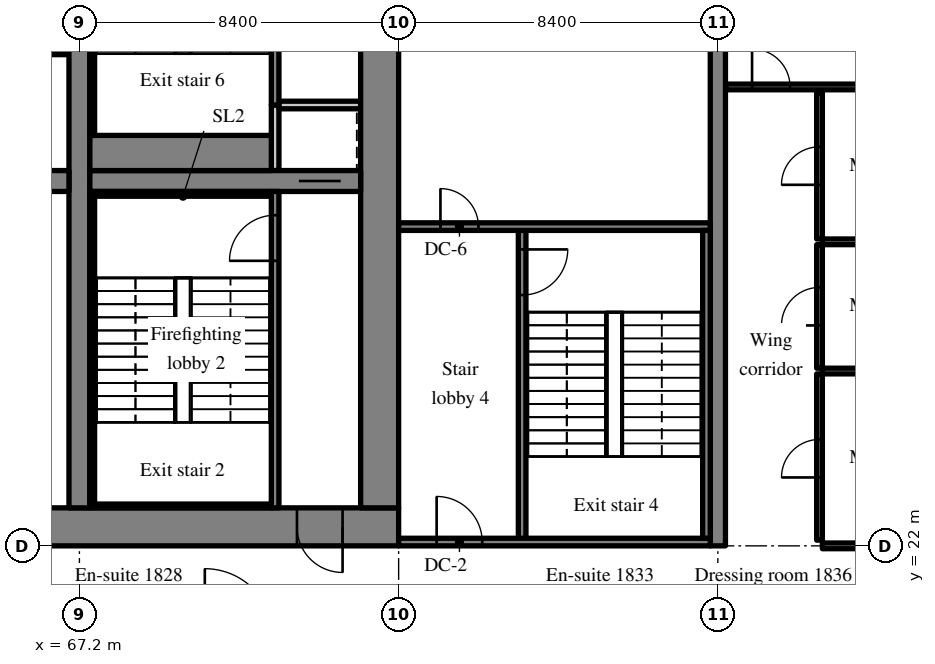
"""IFC4 building model, lengths in metres.
Left out: names, types, materials, properties, quantities, classifications, styles, units other than length and angle.
Written with IfcOpenShell. Run it as: python <this file> out.ifc"""

import sys

from ifc_helpers import new_model, si_unit, direction, frame, frame_2d, origin, place, context, subcontext, project, spatial, rectangle, extrude, source, transform, mapped, element, fill, save


model = new_model("IFC4")
c1 = context("Model", 3, precision=1e-05, world=origin(), true_north=direction((0.0, 1.0)))
c2 = subcontext(c1, "Body", "Model", "MODEL_VIEW")
j1 = project(units=[si_unit("LENGTHUNIT", "METRE"), si_unit("PLANEANGLEUNIT", "RADIAN")], contexts=[c1])
p1 = place(None, origin())
s1 = spatial("IfcSite", under=j1, at=p1, CompositionType="ELEMENT")
p2 = place(p1, origin())
s2 = spatial("IfcBuilding", under=s1, at=p2, CompositionType="ELEMENT")
p3 = place(p2, frame((0.0, 0.0, 77.2)))
s3 = spatial("IfcBuildingStorey", under=s2, at=p3, CompositionType="ELEMENT", Elevation=77.2)
m1 = source(origin(), c2, "Body", "SweptSolid", [
    extrude(rectangle(XDim=50.4, YDim=1.0, at=frame_2d((25.2, 0.0))), origin(), (0.0, 0.0, 1.0), 3.52),
])
p4 = place(p3, frame((25.2, 22.5, 0.0), z_axis=(0.0, 0.0, 1.0), x_axis=(1.0, 0.0, 0.0)))
e1 = element("IfcWall", 1, at=p4, inside=s3, PredefinedType="SHEAR", context=c2, shape_type="MappedRepresentation", body=[
    mapped(m1, transform((0.0, 0.0, 0.0), scale=1.0)),
])
m2 = source(origin(), c2, "Body", "SweptSolid", [
    extrude(rectangle(XDim=1.8, YDim=2.1, at=frame_2d((0.9, 1.05))), frame((0.0, 0.51, 0.0), z_axis=(0.0, -1.0, 0.0), x_axis=(1.0, 0.0, 0.0)), (0.0, 0.0, 1.0), 1.02),
])
p5 = place(p4, frame((15.9, 0.0, 0.0)))
e2 = element("IfcOpeningElement", 2, at=p5, cuts=e1, PredefinedType="OPENING", context=c2, shape_type="MappedRepresentation", body=[
    mapped(m2, transform((0.0, 0.0, 0.0), scale=1.0)),
])
m3 = source(origin(), c2, "Body", "SweptSolid", [
    extrude(rectangle(XDim=1.2, YDim=2.1, at=frame_2d((0.6, 1.05))), frame((0.0, 0.51, 0.0), z_axis=(0.0, -1.0, 0.0), x_axis=(1.0, 0.0, 0.0)), (0.0, 0.0, 1.0), 1.02),
])
p6 = place(p4, frame((26.987, 0.0, 0.0)))
e3 = element("IfcOpeningElement", 3, at=p6, cuts=e1, PredefinedType="OPENING", context=c2, shape_type="MappedRepresentation", body=[
    mapped(m3, transform((0.0, 0.0, 0.0), scale=1.0)),
])
m4 = source(origin(), c2, "Body", "SweptSolid", [
    extrude(rectangle(XDim=0.9, YDim=2.1, at=frame_2d((0.45, 1.05))), frame((0.0, 0.51, 0.0), z_axis=(0.0, -1.0, 0.0), x_axis=(1.0, 0.0, 0.0)), (0.0, 0.0, 1.0), 1.02),
])
p7 = place(p4, frame((32.25, 0.0, 0.0)))
e4 = element("IfcOpeningElement", 4, at=p7, cuts=e1, PredefinedType="OPENING", context=c2, shape_type="MappedRepresentation", body=[
    mapped(m4, transform((0.0, 0.0, 0.0), scale=1.0)),
])
p8 = place(p4, frame((38.262, 0.0, 0.0)))
e5 = element("IfcOpeningElement", 5, at=p8, cuts=e1, PredefinedType="OPENING", context=c2, shape_type="MappedRepresentation", body=[
    mapped(m4, transform((0.0, 0.0, 0.0), scale=1.0)),
])
p9 = place(p4, frame((6.438, 0.0, 0.0)))
e6 = element("IfcOpeningElement", 6, at=p9, cuts=e1, PredefinedType="OPENING", context=c2, shape_type="MappedRepresentation", body=[
    mapped(m3, transform((0.0, 0.0, 0.0), scale=1.0)),
])
p10 = place(p4, frame((47.725, 0.0, 0.0)))
e7 = element("IfcOpeningElement", 7, at=p10, cuts=e1, PredefinedType="OPENING", context=c2, shape_type="MappedRepresentation", body=[
    mapped(m3, transform((0.0, 0.0, 0.0), scale=1.0)),
])
m5 = source(origin(), c2, "Body", "SweptSolid", [
    extrude(rectangle(XDim=18.0, YDim=1.0, at=frame_2d((9.0, 0.0))), origin(), (0.0, 0.0, 1.0), 3.52),
])
p11 = place(p3, frame((75.1, 23.0, 0.0), z_axis=(0.0, 0.0, 1.0), x_axis=(0.0, 1.0, 0.0)))
e8 = element("IfcWall", 8, at=p11, inside=s3, PredefinedType="SHEAR", context=c2, shape_type="MappedRepresentation", body=[
    mapped(m5, transform((0.0, 0.0, 0.0), scale=1.0)),
])
p12 = place(p11, frame((12.4, 0.0, 0.0)))
e9 = element("IfcOpeningElement", 9, at=p12, cuts=e8, PredefinedType="OPENING", context=c2, shape_type="MappedRepresentation", body=[
    mapped(m3, transform((0.0, 0.0, 0.0), scale=1.0)),
])
m6 = source(origin(), c2, "Body", "SweptSolid", [
    extrude(rectangle(XDim=18.0, YDim=0.55, at=frame_2d((9.0, 0.0))), origin(), (0.0, 0.0, 1.0), 3.52),
])
p13 = place(p3, frame((67.2, 23.0, 0.0), z_axis=(0.0, 0.0, 1.0), x_axis=(0.0, 1.0, 0.0)))
e10 = element("IfcWall", 10, at=p13, inside=s3, PredefinedType="SHEAR", context=c2, shape_type="MappedRepresentation", body=[
    mapped(m6, transform((0.0, 0.0, 0.0), scale=1.0)),
])
m7 = source(origin(), c2, "Body", "SweptSolid", [
    extrude(rectangle(XDim=16.25, YDim=0.55, at=frame_2d((8.125, 0.0))), origin(), (0.0, 0.0, 1.0), 3.52),
])
p14 = place(p3, frame((50.675, 31.6, 0.0), z_axis=(0.0, 0.0, 1.0), x_axis=(1.0, 0.0, 0.0)))
e11 = element("IfcWall", 11, at=p14, inside=s3, PredefinedType="SHEAR", context=c2, shape_type="MappedRepresentation", body=[
    mapped(m7, transform((0.0, 0.0, 0.0), scale=1.0)),
])
m8 = source(origin(), c2, "Body", "SweptSolid", [
    extrude(rectangle(XDim=1.0, YDim=2.1, at=frame_2d((0.5, 1.05))), frame((0.0, 0.285, 0.0), z_axis=(0.0, -1.0, 0.0), x_axis=(1.0, 0.0, 0.0)), (0.0, 0.0, 1.0), 0.57),
])
p15 = place(p14, frame((0.562, 0.0, 0.0)))
e12 = element("IfcOpeningElement", 12, at=p15, cuts=e11, PredefinedType="OPENING", context=c2, shape_type="MappedRepresentation", body=[
    mapped(m8, transform((0.0, 0.0, 0.0), scale=1.0)),
])
m9 = source(origin(), c2, "Body", "SweptSolid", [
    extrude(rectangle(XDim=7.125, YDim=0.55, at=frame_2d((3.562, 0.0))), origin(), (0.0, 0.0, 1.0), 3.52),
])
p16 = place(p3, frame((67.475, 31.6, 0.0), z_axis=(0.0, 0.0, 1.0), x_axis=(1.0, 0.0, 0.0)))
e13 = element("IfcWall", 13, at=p16, inside=s3, PredefinedType="SHEAR", context=c2, shape_type="MappedRepresentation", body=[
    mapped(m9, transform((0.0, 0.0, 0.0), scale=1.0)),
])
m10 = source(origin(), c2, "Body", "SweptSolid", [
    extrude(rectangle(XDim=1.1, YDim=2.1, at=frame_2d((0.55, 1.05))), frame((0.0, 0.285, 0.0), z_axis=(0.0, -1.0, 0.0), x_axis=(1.0, 0.0, 0.0)), (0.0, 0.0, 1.0), 0.57),
])
p17 = place(p16, frame((5.5, 0.0, 0.0)))
e14 = element("IfcOpeningElement", 14, at=p17, cuts=e13, PredefinedType="OPENING", context=c2, shape_type="MappedRepresentation", body=[
    mapped(m10, transform((0.0, 0.0, 0.0), scale=1.0)),
])
m11 = source(origin(), c2, "Body", "SweptSolid", [
    extrude(rectangle(XDim=20.0, YDim=0.4, at=frame_2d((10.0, 0.0))), origin(), (0.0, 0.0, 1.0), 3.52),
])
p18 = place(p3, frame((84.0, 22.0, 0.0), z_axis=(0.0, 0.0, 1.0), x_axis=(0.0, 1.0, 0.0)))
e15 = element("IfcWall", 15, at=p18, inside=s3, PredefinedType="SHEAR", context=c2, shape_type="MappedRepresentation", body=[
    mapped(m11, transform((0.0, 0.0, 0.0), scale=1.0)),
])
m12 = source(origin(), c2, "Body", "SweptSolid", [
    extrude(rectangle(XDim=14.125, YDim=0.15, at=frame_2d((7.062, 0.0))), origin(), (0.0, 0.0, 1.0), 3.52),
])
p19 = place(p3, frame((66.925, 35.0, 0.0), z_axis=(0.0, 0.0, 1.0), x_axis=(-1.0, 0.0, 0.0)))
e16 = element("IfcWall", 16, at=p19, inside=s3, PredefinedType="PARTITIONING", context=c2, shape_type="MappedRepresentation", body=[
    mapped(m12, transform((0.0, 0.0, 0.0), scale=1.0)),
])
m13 = source(origin(), c2, "Body", "SweptSolid", [
    extrude(rectangle(XDim=0.9, YDim=2.1, at=frame_2d((0.45, 1.05))), frame((0.0, 0.085, 0.0), z_axis=(0.0, -1.0, 0.0), x_axis=(1.0, 0.0, 0.0)), (0.0, 0.0, 1.0), 0.17),
])
p20 = place(p19, frame((6.575, 0.0, 0.0)))
e17 = element("IfcOpeningElement", 17, at=p20, cuts=e16, PredefinedType="OPENING", context=c2, shape_type="MappedRepresentation", body=[
    mapped(m13, transform((0.0, 0.0, 0.0), scale=1.0)),
])
m14 = source(origin(), c2, "Body", "SweptSolid", [
    extrude(rectangle(XDim=8.325, YDim=0.2, at=frame_2d((4.163, 0.0))), origin(), (0.0, 0.0, 1.0), 3.52),
])
p21 = place(p3, frame((72.35, 23.0, 0.0), z_axis=(0.0, 0.0, 1.0), x_axis=(0.0, 1.0, 0.0)))
e18 = element("IfcWall", 18, at=p21, inside=s3, PredefinedType="SOLIDWALL", context=c2, shape_type="MappedRepresentation", body=[
    mapped(m14, transform((0.0, 0.0, 0.0), scale=1.0)),
])
m15 = source(origin(), c2, "Body", "SweptSolid", [
    extrude(rectangle(XDim=1.2, YDim=2.1, at=frame_2d((0.6, 1.05))), frame((0.0, 0.11, 0.0), z_axis=(0.0, -1.0, 0.0), x_axis=(1.0, 0.0, 0.0)), (0.0, 0.0, 1.0), 0.22),
])
p22 = place(p21, frame((6.5, 0.0, 0.0)))
e19 = element("IfcOpeningElement", 19, at=p22, cuts=e18, PredefinedType="OPENING", context=c2, shape_type="MappedRepresentation", body=[
    mapped(m15, transform((0.0, 0.0, 0.0), scale=1.0)),
])
m16 = source(origin(), c2, "Body", "SweptSolid", [
    extrude(rectangle(XDim=1.725, YDim=0.2, at=frame_2d((0.863, 0.0))), origin(), (0.0, 0.0, 1.0), 3.52),
])
p23 = place(p3, frame((72.35, 31.875, 0.0), z_axis=(0.0, 0.0, 1.0), x_axis=(0.0, 1.0, 0.0)))
e20 = element("IfcWall", 20, at=p23, inside=s3, PredefinedType="SOLIDWALL", context=c2, shape_type="MappedRepresentation", body=[
    mapped(m16, transform((0.0, 0.0, 0.0), scale=1.0)),
])
m17 = source(origin(), c2, "Body", "SweptSolid", [
    extrude(rectangle(XDim=2.15, YDim=0.2, at=frame_2d((1.075, 0.0))), origin(), (0.0, 0.0, 1.0), 3.52),
])
p24 = place(p3, frame((72.45, 33.6, 0.0), z_axis=(0.0, 0.0, 1.0), x_axis=(1.0, 0.0, 0.0)))
e21 = element("IfcWall", 21, at=p24, inside=s3, PredefinedType="SOLIDWALL", context=c2, shape_type="MappedRepresentation", body=[
    mapped(m17, transform((0.0, 0.0, 0.0), scale=1.0)),
])
m18 = source(origin(), c2, "Body", "SweptSolid", [
    extrude(rectangle(XDim=7.4, YDim=0.2, at=frame_2d((3.7, 0.0))), origin(), (0.0, 0.0, 1.0), 3.52),
])
p25 = place(p3, frame((72.35, 33.6, 0.0), z_axis=(0.0, 0.0, 1.0), x_axis=(0.0, 1.0, 0.0)))
e22 = element("IfcWall", 22, at=p25, inside=s3, PredefinedType="SOLIDWALL", context=c2, shape_type="MappedRepresentation", body=[
    mapped(m18, transform((0.0, 0.0, 0.0), scale=1.0)),
])
m19 = source(origin(), c2, "Body", "SweptSolid", [
    extrude(rectangle(XDim=1.8, YDim=2.1, at=frame_2d((0.9, 1.05))), frame((0.0, 0.11, 0.0), z_axis=(0.0, -1.0, 0.0), x_axis=(1.0, 0.0, 0.0)), (0.0, 0.0, 1.0), 0.22),
])
p26 = place(p25, frame((5.3, 0.0, 0.0)))
e23 = element("IfcOpeningElement", 23, at=p26, cuts=e22, PredefinedType="OPENING", context=c2, shape_type="MappedRepresentation", body=[
    mapped(m19, transform((0.0, 0.0, 0.0), scale=1.0)),
])
m20 = source(origin(), c2, "Body", "SweptSolid", [
    extrude(rectangle(XDim=8.3, YDim=0.2, at=frame_2d((4.15, 0.0))), origin(), (0.0, 0.0, 1.0), 3.52),
])
p27 = place(p3, frame((78.85, 22.1, 0.0), z_axis=(0.0, 0.0, 1.0), x_axis=(0.0, 1.0, 0.0)))
e24 = element("IfcWall", 24, at=p27, inside=s3, PredefinedType="SOLIDWALL", context=c2, shape_type="MappedRepresentation", body=[
    mapped(m20, transform((0.0, 0.0, 0.0), scale=1.0)),
])
p28 = place(p27, frame((6.5, 0.0, 0.0)))
e25 = element("IfcOpeningElement", 25, at=p28, cuts=e24, PredefinedType="OPENING", context=c2, shape_type="MappedRepresentation", body=[
    mapped(m15, transform((0.0, 0.0, 0.0), scale=1.0)),
])
m21 = source(origin(), c2, "Body", "SweptSolid", [
    extrude(rectangle(XDim=8.2, YDim=0.2, at=frame_2d((4.1, 0.0))), origin(), (0.0, 0.0, 1.0), 3.52),
])
p29 = place(p3, frame((83.8, 22.1, 0.0), z_axis=(0.0, 0.0, 1.0), x_axis=(-1.0, 0.0, 0.0)))
e26 = element("IfcWall", 26, at=p29, inside=s3, PredefinedType="SOLIDWALL", context=c2, shape_type="MappedRepresentation", body=[
    mapped(m21, transform((0.0, 0.0, 0.0), scale=1.0)),
])
p30 = place(p29, frame((6.0, 0.0, 0.0)))
e27 = element("IfcOpeningElement", 27, at=p30, cuts=e26, PredefinedType="OPENING", context=c2, shape_type="MappedRepresentation", body=[
    mapped(m15, transform((0.0, 0.0, 0.0), scale=1.0)),
])
p31 = place(p3, frame((83.8, 30.4, 0.0), z_axis=(0.0, 0.0, 1.0), x_axis=(-1.0, 0.0, 0.0)))
e28 = element("IfcWall", 28, at=p31, inside=s3, PredefinedType="SOLIDWALL", context=c2, shape_type="MappedRepresentation", body=[
    mapped(m21, transform((0.0, 0.0, 0.0), scale=1.0)),
])
m22 = source(origin(), c2, "Body", "SweptSolid", [
    extrude(rectangle(XDim=1.0, YDim=2.1, at=frame_2d((0.5, 1.05))), frame((0.0, 0.11, 0.0), z_axis=(0.0, -1.0, 0.0), x_axis=(1.0, 0.0, 0.0)), (0.0, 0.0, 1.0), 0.22),
])
p32 = place(p31, frame((6.1, 0.0, 0.0)))
e29 = element("IfcOpeningElement", 29, at=p32, cuts=e28, PredefinedType="OPENING", context=c2, shape_type="MappedRepresentation", body=[
    mapped(m22, transform((0.0, 0.0, 0.0), scale=1.0)),
])
m23 = source(origin(), c2, "Body", "SweptSolid", [
    extrude(rectangle(XDim=4.775, YDim=0.1, at=frame_2d((2.387, 0.0))), origin(), (0.0, 0.0, 1.0), 3.52),
])
p33 = place(p3, frame((67.475, 23.05, 0.0), z_axis=(0.0, 0.0, 1.0), x_axis=(1.0, 0.0, 0.0)))
e30 = element("IfcWall", 30, at=p33, inside=s3, PredefinedType="SOLIDWALL", context=c2, shape_type="MappedRepresentation", body=[
    mapped(m23, transform((0.0, 0.0, 0.0), scale=1.0)),
])
m24 = source(origin(), c2, "Body", "SweptSolid", [
    extrude(rectangle(XDim=4.775, YDim=0.125, at=frame_2d((2.387, 0.0))), origin(), (0.0, 0.0, 1.0), 3.52),
])
p34 = place(p3, frame((67.475, 31.262, 0.0), z_axis=(0.0, 0.0, 1.0), x_axis=(1.0, 0.0, 0.0)))
e31 = element("IfcWall", 31, at=p34, inside=s3, PredefinedType="SOLIDWALL", context=c2, shape_type="MappedRepresentation", body=[
    mapped(m24, transform((0.0, 0.0, 0.0), scale=1.0)),
])
m25 = source(origin(), c2, "Body", "SweptSolid", [
    extrude(rectangle(XDim=8.1, YDim=0.125, at=frame_2d((4.05, 0.0))), origin(), (0.0, 0.0, 1.0), 3.52),
])
p35 = place(p3, frame((67.537, 23.1, 0.0), z_axis=(0.0, 0.0, 1.0), x_axis=(0.0, 1.0, 0.0)))
e32 = element("IfcWall", 32, at=p35, inside=s3, PredefinedType="SOLIDWALL", context=c2, shape_type="MappedRepresentation", body=[
    mapped(m25, transform((0.0, 0.0, 0.0), scale=1.0)),
])
m26 = source(origin(), c2, "Body", "SweptSolid", [
    extrude(rectangle(XDim=4.775, YDim=0.925, at=frame_2d((2.387, 0.0))), origin(), (0.0, 0.0, 1.0), 3.52),
])
p36 = place(p3, frame((67.475, 32.337, 0.0), z_axis=(0.0, 0.0, 1.0), x_axis=(1.0, 0.0, 0.0)))
e33 = element("IfcWall", 33, at=p36, inside=s3, PredefinedType="SOLIDWALL", context=c2, shape_type="MappedRepresentation", body=[
    mapped(m26, transform((0.0, 0.0, 0.0), scale=1.0)),
])
p37 = place(p3, frame((67.537, 32.8, 0.0), z_axis=(0.0, 0.0, 1.0), x_axis=(0.0, 1.0, 0.0)))
e34 = element("IfcWall", 34, at=p37, inside=s3, PredefinedType="SOLIDWALL", context=c2, shape_type="MappedRepresentation", body=[
    mapped(m25, transform((0.0, 0.0, 0.0), scale=1.0)),
])
m27 = source(origin(), c2, "Body", "SweptSolid", [
    extrude(rectangle(XDim=8.1, YDim=0.2, at=frame_2d((4.05, 0.0))), origin(), (0.0, 0.0, 1.0), 3.52),
])
p38 = place(p3, frame((83.7, 22.2, 0.0), z_axis=(0.0, 0.0, 1.0), x_axis=(0.0, 1.0, 0.0)))
e35 = element("IfcWall", 35, at=p38, inside=s3, PredefinedType="SOLIDWALL", context=c2, shape_type="MappedRepresentation", body=[
    mapped(m27, transform((0.0, 0.0, 0.0), scale=1.0)),
])
m28 = source(origin(), c2, "Body", "SweptSolid", [
    extrude(rectangle(XDim=5.45, YDim=0.15, at=frame_2d((2.725, 0.0))), origin(), (0.0, 0.0, 1.0), 2.82),
])
p39 = place(p3, frame((86.75, 22.0, 0.0), z_axis=(0.0, 0.0, 1.0), x_axis=(1.0, 0.0, 0.0)))
e36 = element("IfcWall", 36, at=p39, inside=s3, PredefinedType="PARTITIONING", context=c2, shape_type="MappedRepresentation", body=[
    mapped(m28, transform((0.0, 0.0, 0.0), scale=1.0)),
])
m29 = source(origin(), c2, "Body", "SweptSolid", [
    extrude(rectangle(XDim=4.375, YDim=0.15, at=frame_2d((2.188, 0.0))), origin(), (0.0, 0.0, 1.0), 3.52),
])
p40 = place(p3, frame((86.675, 22.15, 0.0), z_axis=(0.0, 0.0, 1.0), x_axis=(0.0, 1.0, 0.0)))
e37 = element("IfcWall", 37, at=p40, inside=s3, PredefinedType="PARTITIONING", context=c2, shape_type="MappedRepresentation", body=[
    mapped(m29, transform((0.0, 0.0, 0.0), scale=1.0)),
])
m30 = source(origin(), c2, "Body", "SweptSolid", [
    extrude(rectangle(XDim=1.0, YDim=2.1, at=frame_2d((0.5, 1.05))), frame((0.0, 0.085, 0.0), z_axis=(0.0, -1.0, 0.0), x_axis=(1.0, 0.0, 0.0)), (0.0, 0.0, 1.0), 0.17),
])
p41 = place(p40, frame((1.65, 0.0, 0.0)))
e38 = element("IfcOpeningElement", 38, at=p41, cuts=e37, PredefinedType="OPENING", context=c2, shape_type="MappedRepresentation", body=[
    mapped(m30, transform((0.0, 0.0, 0.0), scale=1.0)),
])
m31 = source(origin(), c2, "Body", "SweptSolid", [
    extrude(rectangle(XDim=5.45, YDim=0.15, at=frame_2d((2.725, 0.0))), origin(), (0.0, 0.0, 1.0), 3.52),
])
p42 = place(p3, frame((86.75, 26.6, 0.0), z_axis=(0.0, 0.0, 1.0), x_axis=(1.0, 0.0, 0.0)))
e39 = element("IfcWall", 39, at=p42, inside=s3, PredefinedType="PARTITIONING", context=c2, shape_type="MappedRepresentation", body=[
    mapped(m31, transform((0.0, 0.0, 0.0), scale=1.0)),
])
m32 = source(origin(), c2, "Body", "SweptSolid", [
    extrude(rectangle(XDim=3.25, YDim=0.15, at=frame_2d((1.625, 0.0))), origin(), (0.0, 0.0, 1.0), 3.52),
])
p43 = place(p3, frame((86.675, 26.675, 0.0), z_axis=(0.0, 0.0, 1.0), x_axis=(0.0, 1.0, 0.0)))
e40 = element("IfcWall", 40, at=p43, inside=s3, PredefinedType="PARTITIONING", context=c2, shape_type="MappedRepresentation", body=[
    mapped(m32, transform((0.0, 0.0, 0.0), scale=1.0)),
])
p44 = place(p43, frame((1.125, 0.0, 0.0)))
e41 = element("IfcOpeningElement", 41, at=p44, cuts=e40, PredefinedType="OPENING", context=c2, shape_type="MappedRepresentation", body=[
    mapped(m30, transform((0.0, 0.0, 0.0), scale=1.0)),
])
p45 = place(p3, frame((86.75, 30.0, 0.0), z_axis=(0.0, 0.0, 1.0), x_axis=(1.0, 0.0, 0.0)))
e42 = element("IfcWall", 42, at=p45, inside=s3, PredefinedType="PARTITIONING", context=c2, shape_type="MappedRepresentation", body=[
    mapped(m31, transform((0.0, 0.0, 0.0), scale=1.0)),
])
m33 = source(origin(), c2, "Body", "SweptSolid", [
    extrude(rectangle(XDim=3.85, YDim=0.15, at=frame_2d((1.925, 0.0))), origin(), (0.0, 0.0, 1.0), 3.52),
])
p46 = place(p3, frame((86.675, 30.075, 0.0), z_axis=(0.0, 0.0, 1.0), x_axis=(0.0, 1.0, 0.0)))
e43 = element("IfcWall", 43, at=p46, inside=s3, PredefinedType="PARTITIONING", context=c2, shape_type="MappedRepresentation", body=[
    mapped(m33, transform((0.0, 0.0, 0.0), scale=1.0)),
])
p47 = place(p46, frame((1.425, 0.0, 0.0)))
e44 = element("IfcOpeningElement", 44, at=p47, cuts=e43, PredefinedType="OPENING", context=c2, shape_type="MappedRepresentation", body=[
    mapped(m30, transform((0.0, 0.0, 0.0), scale=1.0)),
])
m34 = source(origin(), c2, "Body", "SweptSolid", [
    extrude(rectangle(XDim=8.0, YDim=0.15, at=frame_2d((4.0, 0.0))), origin(), (0.0, 0.0, 1.0), 3.52),
])
p48 = place(p3, frame((84.2, 34.075, 0.0), z_axis=(0.0, 0.0, 1.0), x_axis=(1.0, 0.0, 0.0)))
e45 = element("IfcWall", 45, at=p48, inside=s3, PredefinedType="PARTITIONING", context=c2, shape_type="MappedRepresentation", body=[
    mapped(m34, transform((0.0, 0.0, 0.0), scale=1.0)),
])
p49 = place(p48, frame((0.7, 0.0, 0.0)))
e46 = element("IfcOpeningElement", 46, at=p49, cuts=e45, PredefinedType="OPENING", context=c2, shape_type="MappedRepresentation", body=[
    mapped(m30, transform((0.0, 0.0, 0.0), scale=1.0)),
])
m35 = source(origin(), c2, "Body", "SweptSolid", [
    extrude(rectangle(XDim=1.2, YDim=2.1, at=frame_2d((0.6, 1.05))), frame((0.0, 0.025, 0.0), z_axis=(0.0, -1.0, 0.0), x_axis=(1.0, 0.0, 0.0)), (0.0, 0.0, 1.0), 0.05),
])
p50 = place(p22, origin())
e47 = element("IfcDoor", 47, at=p50, inside=s3, OperationType="SINGLE_SWING_LEFT", PredefinedType="DOOR", context=c2, shape_type="MappedRepresentation", body=[
    mapped(m35, transform((0.0, 0.0, 0.0), scale=1.0)),
])
fill(e19, e47)
m36 = source(origin(), c2, "Body", "SweptSolid", [
    extrude(rectangle(XDim=1.2, YDim=2.1, at=frame_2d((0.6, 1.05))), frame((0.0, 0.375, 0.0), z_axis=(0.0, -1.0, 0.0), x_axis=(1.0, 0.0, 0.0)), (0.0, 0.0, 1.0), 0.05),
])
p51 = place(p10, origin())
e48 = element("IfcDoor", 48, at=p51, inside=s3, OperationType="SINGLE_SWING_RIGHT", PredefinedType="DOOR", context=c2, shape_type="MappedRepresentation", body=[
    mapped(m36, transform((0.0, 0.0, 0.0), scale=1.0)),
])
fill(e7, e48)
m37 = source(origin(), c2, "Body", "SweptSolid", [
    extrude(rectangle(XDim=1.1, YDim=2.1, at=frame_2d((0.55, 1.05))), frame((0.0, 0.025, 0.0), z_axis=(0.0, -1.0, 0.0), x_axis=(1.0, 0.0, 0.0)), (0.0, 0.0, 1.0), 0.05),
])
p52 = place(p17, origin())
e49 = element("IfcDoor", 49, at=p52, inside=s3, OperationType="SLIDING_TO_RIGHT", PredefinedType="DOOR", context=c2, shape_type="MappedRepresentation", body=[
    mapped(m37, transform((0.0, 0.0, 0.0), scale=1.0)),
])
fill(e14, e49)
p53 = place(p28, origin())
e50 = element("IfcDoor", 50, at=p53, inside=s3, OperationType="SINGLE_SWING_RIGHT", PredefinedType="DOOR", context=c2, shape_type="MappedRepresentation", body=[
    mapped(m35, transform((0.0, 0.0, 0.0), scale=1.0)),
])
fill(e25, e50)
p54 = place(p30, origin())
e51 = element("IfcDoor", 51, at=p54, inside=s3, OperationType="SINGLE_SWING_RIGHT", PredefinedType="DOOR", context=c2, shape_type="MappedRepresentation", body=[
    mapped(m35, transform((0.0, 0.0, 0.0), scale=1.0)),
])
fill(e27, e51)
m38 = source(origin(), c2, "Body", "SweptSolid", [
    extrude(rectangle(XDim=1.0, YDim=2.1, at=frame_2d((0.5, 1.05))), frame((0.0, 0.025, 0.0), z_axis=(0.0, -1.0, 0.0), x_axis=(1.0, 0.0, 0.0)), (0.0, 0.0, 1.0), 0.05),
])
p55 = place(p32, origin())
e52 = element("IfcDoor", 52, at=p55, inside=s3, OperationType="SINGLE_SWING_RIGHT", PredefinedType="DOOR", context=c2, shape_type="MappedRepresentation", body=[
    mapped(m38, transform((0.0, 0.0, 0.0), scale=1.0)),
])
fill(e29, e52)
p56 = place(p41, origin())
e53 = element("IfcDoor", 53, at=p56, inside=s3, OperationType="SINGLE_SWING_LEFT", PredefinedType="DOOR", context=c2, shape_type="MappedRepresentation", body=[
    mapped(m38, transform((0.0, 0.0, 0.0), scale=1.0)),
])
fill(e38, e53)
p57 = place(p44, origin())
e54 = element("IfcDoor", 54, at=p57, inside=s3, OperationType="SINGLE_SWING_LEFT", PredefinedType="DOOR", context=c2, shape_type="MappedRepresentation", body=[
    mapped(m38, transform((0.0, 0.0, 0.0), scale=1.0)),
])
fill(e41, e54)
p58 = place(p47, origin())
e55 = element("IfcDoor", 55, at=p58, inside=s3, OperationType="SINGLE_SWING_LEFT", PredefinedType="DOOR", context=c2, shape_type="MappedRepresentation", body=[
    mapped(m38, transform((0.0, 0.0, 0.0), scale=1.0)),
])
fill(e44, e55)
p59 = place(p49, origin())
e56 = element("IfcDoor", 56, at=p59, inside=s3, OperationType="SINGLE_SWING_LEFT", PredefinedType="DOOR", context=c2, shape_type="MappedRepresentation", body=[
    mapped(m38, transform((0.0, 0.0, 0.0), scale=1.0)),
])
fill(e46, e56)
save(model, sys.argv[1])
